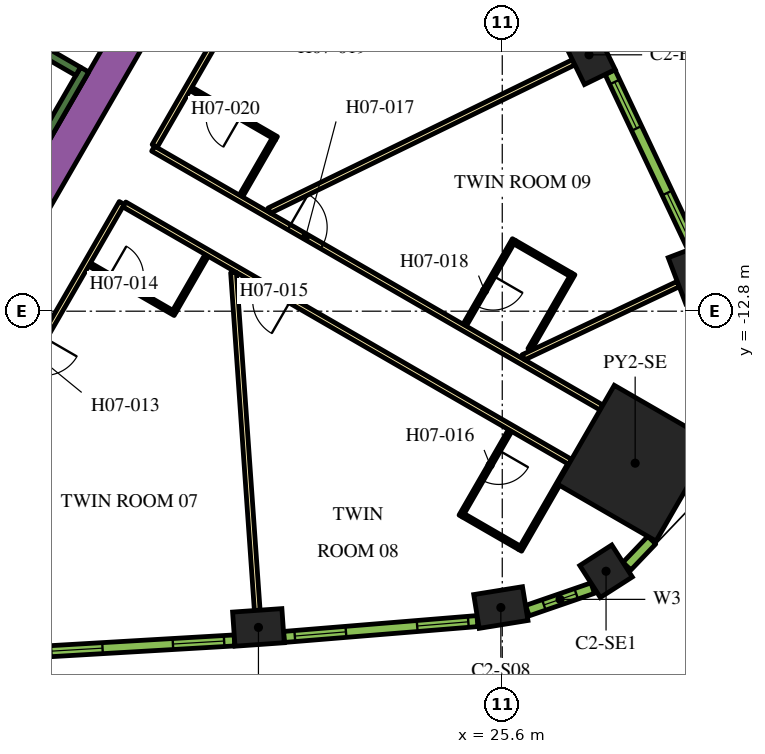
"""IFC4 building model, lengths in metres.
Left out: names, types, materials, properties, quantities, classifications, styles, units other than length and angle.
Written with IfcOpenShell. Run it as: python <this file> out.ifc"""

import sys

from ifc_helpers import new_model, si_unit, direction, frame, frame_2d, origin, origin_2d, place, context, subcontext, project, spatial, rectangle, extrude, element, fill, save


model = new_model("IFC4")
c1 = context("Model", 3, precision=1e-05, world=origin(), true_north=direction((0.0, 1.0)))
c2 = subcontext(c1, "Body", "Model", "MODEL_VIEW")
j1 = project(units=[si_unit("LENGTHUNIT", "METRE"), si_unit("PLANEANGLEUNIT", "RADIAN")], contexts=[c1])
p1 = place(None, origin())
s1 = spatial("IfcSite", under=j1, at=p1, CompositionType="ELEMENT")
p2 = place(p1, origin())
s2 = spatial("IfcBuilding", under=s1, at=p2, CompositionType="ELEMENT")
p3 = place(p2, frame((0.0, 0.0, 99.3)))
s3 = spatial("IfcBuildingStorey", under=s2, at=p3, CompositionType="ELEMENT", Elevation=99.3)
p4 = place(p3, frame((29.097, -16.799, 0.0), z_axis=(0.0, 0.0, 1.0), x_axis=(0.866025403784, -0.5, 0.0)))
e1 = element("IfcColumn", 1, at=p4, inside=s3, PredefinedType="COLUMN", context=c2, shape_type="SweptSolid", body=[
    extrude(rectangle(XDim=3.0, YDim=3.0, at=origin_2d()), origin(), (0.0, 0.0, 1.0), 3.9),
])
for number, where, z_axis, x_axis in (
    (2, (19.184, -21.12, 0.0), (0.0, 0.0, 1.0), (0.998, 0.07, 0.0)),
    (3, (25.563, -20.597, 0.0), (0.0, 0.0, 1.0), (0.987, 0.159, 0.0)),
):
    element("IfcColumn", number, at=place(p3, frame(where, z_axis=z_axis, x_axis=x_axis)), inside=s3, PredefinedType="COLUMN", context=c2, shape_type="SweptSolid", body=[
        extrude(rectangle(XDim=1.3, YDim=0.9, at=origin_2d()), origin(), (0.0, 0.0, 1.0), 3.9),
    ])
p5 = place(p3, frame((28.331, -19.643, 0.0), z_axis=(0.0, 0.0, 1.0), x_axis=(0.841700252504, 0.53994507585, 0.0)))
e4 = element("IfcColumn", 4, at=p5, inside=s3, PredefinedType="COLUMN", context=c2, shape_type="SweptSolid", body=[
    extrude(rectangle(XDim=1.0, YDim=1.0, at=origin_2d()), origin(), (0.0, 0.0, 1.0), 3.9),
])
for number, where, z_axis, x_axis in (
    (5, (30.619, -11.839, 0.0), (0.0, 0.0, 1.0), (-0.355, 0.935, 0.0)),
    (6, (27.883, -6.054, 0.0), (0.0, 0.0, 1.0), (-0.438, 0.899, 0.0)),
):
    element("IfcColumn", number, at=place(p3, frame(where, z_axis=z_axis, x_axis=x_axis)), inside=s3, PredefinedType="COLUMN", context=c2, shape_type="SweptSolid", body=[
        extrude(rectangle(XDim=1.3, YDim=0.9, at=origin_2d()), origin(), (0.0, 0.0, 1.0), 3.9),
    ])
p6 = place(p3, frame((11.695, -12.644, 0.0), z_axis=(0.0, 0.0, 1.0), x_axis=(0.500010229568, 0.86601949766, 0.0)))
e7 = element("IfcWall", 7, at=p6, inside=s3, PredefinedType="SOLIDWALL", context=c2, shape_type="SweptSolid", body=[
    extrude(rectangle(XDim=9.326, YDim=0.9, at=frame_2d((4.663, 0.0))), origin(), (0.0, 0.0, 1.0), 3.9),
])
p7 = place(p3, frame((12.885, -9.431, 0.0), z_axis=(0.0, 0.0, 1.0), x_axis=(0.500020560727, 0.866013532718, 0.0)))
e8 = element("IfcWall", 8, at=p7, inside=s3, PredefinedType="SOLIDWALL", context=c2, shape_type="SweptSolid", body=[
    extrude(rectangle(XDim=3.45, YDim=0.25, at=frame_2d((1.725, 0.0))), origin(), (0.0, 0.0, 1.0), 3.9),
])
p8 = place(p3, frame((8.334, -2.964, 0.0), z_axis=(0.0, 0.0, 1.0), x_axis=(0.866016039709, -0.500016218704, 0.0)))
e9 = element("IfcWall", 9, at=p8, inside=s3, PredefinedType="SOLIDWALL", context=c2, shape_type="SweptSolid", body=[
    extrude(rectangle(XDim=7.05, YDim=0.25, at=frame_2d((3.525, 0.0))), origin(), (0.0, 0.0, 1.0), 3.9),
])
p9 = place(p3, frame((16.412, -8.523, 0.0), z_axis=(0.0, 0.0, 1.0), x_axis=(0.866025629663, -0.499999608766, 0.0)))
e10 = element("IfcWall", 10, at=p9, inside=s3, PredefinedType="PARTITIONING", context=c2, shape_type="SweptSolid", body=[
    extrude(rectangle(XDim=13.624, YDim=0.15, at=frame_2d((6.812, 0.0))), origin(), (0.0, 0.0, 1.0), 2.75),
])
p10 = place(p9, frame((4.134, 0.0, 0.0)))
e11 = element("IfcOpeningElement", 11, at=p10, cuts=e10, PredefinedType="OPENING", context=c2, shape_type="SweptSolid", body=[
    extrude(rectangle(XDim=1.0, YDim=2.1, at=frame_2d((0.5, 1.05))), frame((0.0, 0.085, 0.0), z_axis=(0.0, -1.0, 0.0), x_axis=(1.0, 0.0, 0.0)), (0.0, 0.0, 1.0), 0.17),
])
p11 = place(p3, frame((19.081, -3.9, 0.0), z_axis=(0.0, 0.0, 1.0), x_axis=(-0.499974327079, -0.866040225545, 0.0)))
e12 = element("IfcWall", 12, at=p11, inside=s3, PredefinedType="PARTITIONING", context=c2, shape_type="SweptSolid", body=[
    extrude(rectangle(XDim=5.258, YDim=0.15, at=frame_2d((2.629, 0.0))), origin(), (0.0, 0.0, 1.0), 2.75),
])
p12 = place(p11, frame((0.18, 0.0, 0.0)))
e13 = element("IfcOpeningElement", 13, at=p12, cuts=e12, PredefinedType="OPENING", context=c2, shape_type="SweptSolid", body=[
    extrude(rectangle(XDim=1.0, YDim=2.1, at=frame_2d((0.5, 1.05))), frame((0.0, 0.085, 0.0), z_axis=(0.0, -1.0, 0.0), x_axis=(1.0, 0.0, 0.0)), (0.0, 0.0, 1.0), 0.17),
])
p13 = place(p3, frame((15.587, -9.952, 0.0), z_axis=(0.0, 0.0, 1.0), x_axis=(-0.500016618951, -0.866015808616, 0.0)))
e14 = element("IfcWall", 14, at=p13, inside=s3, PredefinedType="PARTITIONING", context=c2, shape_type="SweptSolid", body=[
    extrude(rectangle(XDim=5.268, YDim=0.15, at=frame_2d((2.634, 0.0))), origin(), (0.0, 0.0, 1.0), 2.75),
])
p14 = place(p13, frame((4.088, 0.0, 0.0)))
e15 = element("IfcOpeningElement", 15, at=p14, cuts=e14, PredefinedType="OPENING", context=c2, shape_type="SweptSolid", body=[
    extrude(rectangle(XDim=1.0, YDim=2.1, at=frame_2d((0.5, 1.05))), frame((0.0, 0.085, 0.0), z_axis=(0.0, -1.0, 0.0), x_axis=(1.0, 0.0, 0.0)), (0.0, 0.0, 1.0), 0.17),
])
p15 = place(p3, frame((27.386, -16.764, 0.0), z_axis=(0.0, 0.0, 1.0), x_axis=(-0.866022585856, 0.500004880763, 0.0)))
e16 = element("IfcWall", 16, at=p15, inside=s3, PredefinedType="PARTITIONING", context=c2, shape_type="SweptSolid", body=[
    extrude(rectangle(XDim=13.544, YDim=0.15, at=frame_2d((6.772, 0.0))), origin(), (0.0, 0.0, 1.0), 2.75),
])
p16 = place(p15, frame((8.491, 0.0, 0.0)))
e17 = element("IfcOpeningElement", 17, at=p16, cuts=e16, PredefinedType="OPENING", context=c2, shape_type="SweptSolid", body=[
    extrude(rectangle(XDim=1.0, YDim=2.1, at=frame_2d((0.5, 1.05))), frame((0.0, 0.085, 0.0), z_axis=(0.0, -1.0, 0.0), x_axis=(1.0, 0.0, 0.0)), (0.0, 0.0, 1.0), 0.17),
])
p17 = place(p3, frame((19.153, -20.671, 0.0), z_axis=(0.0, 0.0, 1.0), x_axis=(-0.070070736723, 0.997542025107, 0.0)))
e18 = element("IfcWall", 18, at=p17, inside=s3, PredefinedType="PARTITIONING", context=c2, shape_type="SweptSolid", body=[
    extrude(rectangle(XDim=8.909, YDim=0.15, at=frame_2d((4.455, 0.0))), origin(), (0.0, 0.0, 1.0), 2.75),
])
p18 = place(p3, frame((27.479, -6.251, 0.0), z_axis=(0.0, 0.0, 1.0), x_axis=(-0.898945877276, -0.438059710231, 0.0)))
e19 = element("IfcWall", 19, at=p18, inside=s3, PredefinedType="PARTITIONING", context=c2, shape_type="SweptSolid", body=[
    extrude(rectangle(XDim=8.909, YDim=0.15, at=frame_2d((4.455, 0.0))), origin(), (0.0, 0.0, 1.0), 2.75),
])
p19 = place(p3, frame((30.231, -12.085, 0.0), z_axis=(0.0, 0.0, 1.0), x_axis=(-0.904001132572, -0.427530060122, 0.0)))
e20 = element("IfcWall", 20, at=p19, inside=s3, PredefinedType="PARTITIONING", context=c2, shape_type="SweptSolid", body=[
    extrude(rectangle(XDim=4.51, YDim=0.15, at=frame_2d((2.255, 0.0))), origin(), (0.0, 0.0, 1.0), 2.75),
])
p20 = place(p3, frame((14.74, -11.57, 0.0), z_axis=(0.0, 0.0, 1.0), x_axis=(0.866021400173, -0.500006934395, 0.0)))
e21 = element("IfcWall", 21, at=p20, inside=s3, PredefinedType="PARTITIONING", context=c2, shape_type="SweptSolid", body=[
    extrude(rectangle(XDim=2.6, YDim=0.1, at=frame_2d((1.3, 0.0))), origin(), (0.0, 0.0, 1.0), 2.75),
])
p21 = place(p20, frame((0.6, 0.0, 0.0)))
e22 = element("IfcOpeningElement", 22, at=p21, cuts=e21, PredefinedType="OPENING", context=c2, shape_type="SweptSolid", body=[
    extrude(rectangle(XDim=0.9, YDim=2.1, at=frame_2d((0.45, 1.05))), frame((0.0, 0.06, 0.0), z_axis=(0.0, -1.0, 0.0), x_axis=(1.0, 0.0, 0.0)), (0.0, 0.0, 1.0), 0.12),
])
p22 = place(p3, frame((16.978, -12.793, 0.0), z_axis=(0.0, 0.0, 1.0), x_axis=(0.500147619332, 0.865940158947, 0.0)))
e23 = element("IfcWall", 23, at=p22, inside=s3, PredefinedType="PARTITIONING", context=c2, shape_type="SweptSolid", body=[
    extrude(rectangle(XDim=1.69, YDim=0.1, at=frame_2d((0.845, 0.0))), origin(), (0.0, 0.0, 1.0), 2.75),
])
p23 = place(p3, frame((25.807, -15.939, 0.0), z_axis=(0.0, 0.0, 1.0), x_axis=(-0.500006934395, -0.866021400173, 0.0)))
e24 = element("IfcWall", 24, at=p23, inside=s3, PredefinedType="PARTITIONING", context=c2, shape_type="SweptSolid", body=[
    extrude(rectangle(XDim=2.6, YDim=0.1, at=frame_2d((1.3, 0.0))), origin(), (0.0, 0.0, 1.0), 2.75),
])
p24 = place(p23, frame((0.6, 0.0, 0.0)))
e25 = element("IfcOpeningElement", 25, at=p24, cuts=e24, PredefinedType="OPENING", context=c2, shape_type="SweptSolid", body=[
    extrude(rectangle(XDim=0.9, YDim=2.1, at=frame_2d((0.45, 1.05))), frame((0.0, 0.06, 0.0), z_axis=(0.0, -1.0, 0.0), x_axis=(1.0, 0.0, 0.0)), (0.0, 0.0, 1.0), 0.12),
])
p25 = place(p3, frame((24.575, -18.172, 0.0), z_axis=(0.0, 0.0, 1.0), x_axis=(0.865989465428, -0.500062241894, 0.0)))
e26 = element("IfcWall", 26, at=p25, inside=s3, PredefinedType="PARTITIONING", context=c2, shape_type="SweptSolid", body=[
    extrude(rectangle(XDim=1.7, YDim=0.1, at=frame_2d((0.85, 0.0))), origin(), (0.0, 0.0, 1.0), 2.75),
])
p26 = place(p3, frame((27.365, -16.839, 0.0), z_axis=(0.0, 0.0, 1.0), x_axis=(-0.500006934395, -0.866021400173, 0.0)))
e27 = element("IfcWall", 27, at=p26, inside=s3, PredefinedType="PARTITIONING", context=c2, shape_type="SweptSolid", body=[
    extrude(rectangle(XDim=2.6, YDim=0.1, at=frame_2d((1.3, 0.0))), origin(), (0.0, 0.0, 1.0), 2.75),
])
p27 = place(p3, frame((25.91, -10.918, 0.0), z_axis=(0.0, 0.0, 1.0), x_axis=(-0.500006934395, -0.866021400173, 0.0)))
e28 = element("IfcWall", 28, at=p27, inside=s3, PredefinedType="PARTITIONING", context=c2, shape_type="SweptSolid", body=[
    extrude(rectangle(XDim=2.6, YDim=0.1, at=frame_2d((1.3, 0.0))), origin(), (0.0, 0.0, 1.0), 2.75),
])
p28 = place(p27, frame((1.1, 0.0, 0.0)))
e29 = element("IfcOpeningElement", 29, at=p28, cuts=e28, PredefinedType="OPENING", context=c2, shape_type="SweptSolid", body=[
    extrude(rectangle(XDim=0.9, YDim=2.1, at=frame_2d((0.45, 1.05))), frame((0.0, 0.06, 0.0), z_axis=(0.0, -1.0, 0.0), x_axis=(1.0, 0.0, 0.0)), (0.0, 0.0, 1.0), 0.12),
])
p29 = place(p3, frame((25.928, -10.986, 0.0), z_axis=(0.0, 0.0, 1.0), x_axis=(0.866025371046, -0.500000056704, 0.0)))
e30 = element("IfcWall", 30, at=p29, inside=s3, PredefinedType="PARTITIONING", context=c2, shape_type="SweptSolid", body=[
    extrude(rectangle(XDim=1.7, YDim=0.1, at=frame_2d((0.85, 0.0))), origin(), (0.0, 0.0, 1.0), 2.75),
])
p30 = place(p3, frame((26.319, -13.81, 0.0), z_axis=(0.0, 0.0, 1.0), x_axis=(0.499952165731, 0.866053019151, 0.0)))
e31 = element("IfcWall", 31, at=p30, inside=s3, PredefinedType="PARTITIONING", context=c2, shape_type="SweptSolid", body=[
    extrude(rectangle(XDim=2.3, YDim=0.1, at=frame_2d((1.15, 0.0))), origin(), (0.0, 0.0, 1.0), 2.75),
])
p31 = place(p3, frame((19.659, -8.25, 0.0), z_axis=(0.0, 0.0, 1.0), x_axis=(-0.866021400173, 0.500006934395, 0.0)))
e32 = element("IfcWall", 32, at=p31, inside=s3, PredefinedType="PARTITIONING", context=c2, shape_type="SweptSolid", body=[
    extrude(rectangle(XDim=2.6, YDim=0.1, at=frame_2d((1.3, 0.0))), origin(), (0.0, 0.0, 1.0), 2.75),
])
p32 = place(p31, frame((1.1, 0.0, 0.0)))
e33 = element("IfcOpeningElement", 33, at=p32, cuts=e32, PredefinedType="OPENING", context=c2, shape_type="SweptSolid", body=[
    extrude(rectangle(XDim=0.9, YDim=2.1, at=frame_2d((0.45, 1.05))), frame((0.0, 0.06, 0.0), z_axis=(0.0, -1.0, 0.0), x_axis=(1.0, 0.0, 0.0)), (0.0, 0.0, 1.0), 0.12),
])
p33 = place(p3, frame((19.591, -8.268, 0.0), z_axis=(0.0, 0.0, 1.0), x_axis=(-0.500040090343, -0.866002256377, 0.0)))
e34 = element("IfcWall", 34, at=p33, inside=s3, PredefinedType="PARTITIONING", context=c2, shape_type="SweptSolid", body=[
    extrude(rectangle(XDim=1.73, YDim=0.1, at=frame_2d((0.865, 0.0))), origin(), (0.0, 0.0, 1.0), 2.75),
])
p34 = place(p3, frame((13.462, -21.761, 0.0), z_axis=(0.0, 0.0, 1.0), x_axis=(0.998290511436, 0.058447025388, 0.0)))
e35 = element("IfcWall", 35, at=p34, inside=s3, PredefinedType="SOLIDWALL", context=c2, shape_type="SweptSolid", body=[
    extrude(rectangle(XDim=5.1, YDim=0.29, at=frame_2d((2.55, 0.0))), origin(), (0.0, 0.0, 1.0), 3.65),
])
p35 = place(p34, frame((0.272, 0.0, 0.9)))
e36 = element("IfcOpeningElement", 36, at=p35, cuts=e35, PredefinedType="OPENING", context=c2, shape_type="SweptSolid", body=[
    extrude(rectangle(XDim=1.35, YDim=2.15, at=frame_2d((0.675, 1.075))), frame((0.0, 0.155, 0.0), z_axis=(0.0, -1.0, 0.0), x_axis=(1.0, 0.0, 0.0)), (0.0, 0.0, 1.0), 0.31),
])
p36 = place(p34, frame((3.478, 0.0, 0.9)))
e37 = element("IfcOpeningElement", 37, at=p36, cuts=e35, PredefinedType="OPENING", context=c2, shape_type="SweptSolid", body=[
    extrude(rectangle(XDim=1.35, YDim=2.15, at=frame_2d((0.675, 1.075))), frame((0.0, 0.155, 0.0), z_axis=(0.0, -1.0, 0.0), x_axis=(1.0, 0.0, 0.0)), (0.0, 0.0, 1.0), 0.31),
])
p37 = place(p3, frame((19.857, -21.371, 0.0), z_axis=(0.0, 0.0, 1.0), x_axis=(0.99665273362, 0.081751627308, 0.0)))
e38 = element("IfcWall", 38, at=p37, inside=s3, PredefinedType="SOLIDWALL", context=c2, shape_type="SweptSolid", body=[
    extrude(rectangle(XDim=5.107, YDim=0.29, at=frame_2d((2.553, 0.0))), origin(), (0.0, 0.0, 1.0), 3.65),
])
p38 = place(p37, frame((0.285, 0.0, 0.9)))
e39 = element("IfcOpeningElement", 39, at=p38, cuts=e38, PredefinedType="OPENING", context=c2, shape_type="SweptSolid", body=[
    extrude(rectangle(XDim=1.35, YDim=2.15, at=frame_2d((0.675, 1.075))), frame((0.0, 0.155, 0.0), z_axis=(0.0, -1.0, 0.0), x_axis=(1.0, 0.0, 0.0)), (0.0, 0.0, 1.0), 0.31),
])
p39 = place(p37, frame((3.516, 0.0, 0.9)))
e40 = element("IfcOpeningElement", 40, at=p39, cuts=e38, PredefinedType="OPENING", context=c2, shape_type="SweptSolid", body=[
    extrude(rectangle(XDim=1.35, YDim=2.15, at=frame_2d((0.675, 1.075))), frame((0.0, 0.155, 0.0), z_axis=(0.0, -1.0, 0.0), x_axis=(1.0, 0.0, 0.0)), (0.0, 0.0, 1.0), 0.31),
])
p40 = place(p3, frame((26.261, -20.679, 0.0), z_axis=(0.0, 0.0, 1.0), x_axis=(0.945385815453, 0.325953462844, 0.0)))
e41 = element("IfcWall", 41, at=p40, inside=s3, PredefinedType="SOLIDWALL", context=c2, shape_type="SweptSolid", body=[
    extrude(rectangle(XDim=1.819, YDim=0.29, at=frame_2d((0.91, 0.0))), origin(), (0.0, 0.0, 1.0), 3.65),
])
p41 = place(p40, frame((0.46, 0.0, 0.9)))
e42 = element("IfcOpeningElement", 42, at=p41, cuts=e41, PredefinedType="OPENING", context=c2, shape_type="SweptSolid", body=[
    extrude(rectangle(XDim=0.9, YDim=2.15, at=frame_2d((0.45, 1.075))), frame((0.0, 0.155, 0.0), z_axis=(0.0, -1.0, 0.0), x_axis=(1.0, 0.0, 0.0)), (0.0, 0.0, 1.0), 0.31),
])
p42 = place(p3, frame((28.88, -19.509, 0.0), z_axis=(0.0, 0.0, 1.0), x_axis=(0.690414427296, 0.723414071319, 0.0)))
e43 = element("IfcWall", 43, at=p42, inside=s3, PredefinedType="SOLIDWALL", context=c2, shape_type="SweptSolid", body=[
    extrude(rectangle(XDim=0.947, YDim=0.29, at=frame_2d((0.474, 0.0))), origin(), (0.0, 0.0, 1.0), 3.65),
])
p43 = place(p3, frame((30.62, -11.127, 0.0), z_axis=(0.0, 0.0, 1.0), x_axis=(-0.427543726596, 0.903994669148, 0.0)))
e44 = element("IfcWall", 44, at=p43, inside=s3, PredefinedType="SOLIDWALL", context=c2, shape_type="SweptSolid", body=[
    extrude(rectangle(XDim=5.107, YDim=0.29, at=frame_2d((2.553, 0.0))), origin(), (0.0, 0.0, 1.0), 3.65),
])
p44 = place(p43, frame((0.24, 0.0, 0.9)))
e45 = element("IfcOpeningElement", 45, at=p44, cuts=e44, PredefinedType="OPENING", context=c2, shape_type="SweptSolid", body=[
    extrude(rectangle(XDim=1.35, YDim=2.15, at=frame_2d((0.675, 1.075))), frame((0.0, 0.155, 0.0), z_axis=(0.0, -1.0, 0.0), x_axis=(1.0, 0.0, 0.0)), (0.0, 0.0, 1.0), 0.31),
])
p45 = place(p43, frame((3.471, 0.0, 0.9)))
e46 = element("IfcOpeningElement", 46, at=p45, cuts=e44, PredefinedType="OPENING", context=c2, shape_type="SweptSolid", body=[
    extrude(rectangle(XDim=1.35, YDim=2.15, at=frame_2d((0.675, 1.075))), frame((0.0, 0.155, 0.0), z_axis=(0.0, -1.0, 0.0), x_axis=(1.0, 0.0, 0.0)), (0.0, 0.0, 1.0), 0.31),
])
p46 = place(p21, origin())
e47 = element("IfcDoor", 47, at=p46, inside=s3, OperationType="SINGLE_SWING_LEFT", PredefinedType="DOOR", context=c2, shape_type="SweptSolid", body=[
    extrude(rectangle(XDim=0.9, YDim=2.1, at=frame_2d((0.45, 1.05))), frame((0.0, 0.025, 0.0), z_axis=(0.0, -1.0, 0.0), x_axis=(1.0, 0.0, 0.0)), (0.0, 0.0, 1.0), 0.05),
])
fill(e22, e47)
p47 = place(p16, origin())
e48 = element("IfcDoor", 48, at=p47, inside=s3, OperationType="SINGLE_SWING_RIGHT", PredefinedType="DOOR", context=c2, shape_type="SweptSolid", body=[
    extrude(rectangle(XDim=1.0, YDim=2.1, at=frame_2d((0.5, 1.05))), frame((0.0, 0.025, 0.0), z_axis=(0.0, -1.0, 0.0), x_axis=(1.0, 0.0, 0.0)), (0.0, 0.0, 1.0), 0.05),
])
fill(e17, e48)
p48 = place(p24, origin())
e49 = element("IfcDoor", 49, at=p48, inside=s3, OperationType="SINGLE_SWING_LEFT", PredefinedType="DOOR", context=c2, shape_type="SweptSolid", body=[
    extrude(rectangle(XDim=0.9, YDim=2.1, at=frame_2d((0.45, 1.05))), frame((0.0, 0.025, 0.0), z_axis=(0.0, -1.0, 0.0), x_axis=(1.0, 0.0, 0.0)), (0.0, 0.0, 1.0), 0.05),
])
fill(e25, e49)
p49 = place(p10, origin())
e50 = element("IfcDoor", 50, at=p49, inside=s3, OperationType="SINGLE_SWING_LEFT", PredefinedType="DOOR", context=c2, shape_type="SweptSolid", body=[
    extrude(rectangle(XDim=1.0, YDim=2.1, at=frame_2d((0.5, 1.05))), frame((0.0, 0.025, 0.0), z_axis=(0.0, -1.0, 0.0), x_axis=(1.0, 0.0, 0.0)), (0.0, 0.0, 1.0), 0.05),
])
fill(e11, e50)
p50 = place(p28, origin())
e51 = element("IfcDoor", 51, at=p50, inside=s3, OperationType="SINGLE_SWING_RIGHT", PredefinedType="DOOR", context=c2, shape_type="SweptSolid", body=[
    extrude(rectangle(XDim=0.9, YDim=2.1, at=frame_2d((0.45, 1.05))), frame((0.0, 0.025, 0.0), z_axis=(0.0, -1.0, 0.0), x_axis=(1.0, 0.0, 0.0)), (0.0, 0.0, 1.0), 0.05),
])
fill(e29, e51)
p51 = place(p32, origin())
e52 = element("IfcDoor", 52, at=p51, inside=s3, OperationType="SINGLE_SWING_LEFT", PredefinedType="DOOR", context=c2, shape_type="SweptSolid", body=[
    extrude(rectangle(XDim=0.9, YDim=2.1, at=frame_2d((0.45, 1.05))), frame((0.0, 0.025, 0.0), z_axis=(0.0, -1.0, 0.0), x_axis=(1.0, 0.0, 0.0)), (0.0, 0.0, 1.0), 0.05),
])
fill(e33, e52)
p52 = place(p35, origin())
e53 = element("IfcWindow", 53, at=p52, inside=s3, PartitioningType="DOUBLE_PANEL_VERTICAL", PredefinedType="WINDOW", context=c2, shape_type="SweptSolid", body=[
    extrude(rectangle(XDim=1.35, YDim=2.15, at=frame_2d((0.675, 1.075))), frame((0.0, 0.015, 0.0), z_axis=(0.0, -1.0, 0.0), x_axis=(1.0, 0.0, 0.0)), (0.0, 0.0, 1.0), 0.06),
])
fill(e36, e53)
p53 = place(p36, origin())
e54 = element("IfcWindow", 54, at=p53, inside=s3, PartitioningType="DOUBLE_PANEL_VERTICAL", PredefinedType="WINDOW", context=c2, shape_type="SweptSolid", body=[
    extrude(rectangle(XDim=1.35, YDim=2.15, at=frame_2d((0.675, 1.075))), frame((0.0, 0.015, 0.0), z_axis=(0.0, -1.0, 0.0), x_axis=(1.0, 0.0, 0.0)), (0.0, 0.0, 1.0), 0.06),
])
fill(e37, e54)
p54 = place(p38, origin())
e55 = element("IfcWindow", 55, at=p54, inside=s3, PartitioningType="DOUBLE_PANEL_VERTICAL", PredefinedType="WINDOW", context=c2, shape_type="SweptSolid", body=[
    extrude(rectangle(XDim=1.35, YDim=2.15, at=frame_2d((0.675, 1.075))), frame((0.0, 0.015, 0.0), z_axis=(0.0, -1.0, 0.0), x_axis=(1.0, 0.0, 0.0)), (0.0, 0.0, 1.0), 0.06),
])
fill(e39, e55)
p55 = place(p39, origin())
e56 = element("IfcWindow", 56, at=p55, inside=s3, PartitioningType="DOUBLE_PANEL_VERTICAL", PredefinedType="WINDOW", context=c2, shape_type="SweptSolid", body=[
    extrude(rectangle(XDim=1.35, YDim=2.15, at=frame_2d((0.675, 1.075))), frame((0.0, 0.015, 0.0), z_axis=(0.0, -1.0, 0.0), x_axis=(1.0, 0.0, 0.0)), (0.0, 0.0, 1.0), 0.06),
])
fill(e40, e56)
p56 = place(p41, origin())
e57 = element("IfcWindow", 57, at=p56, inside=s3, PartitioningType="SINGLE_PANEL", PredefinedType="WINDOW", context=c2, shape_type="SweptSolid", body=[
    extrude(rectangle(XDim=0.9, YDim=2.15, at=frame_2d((0.45, 1.075))), frame((0.0, 0.015, 0.0), z_axis=(0.0, -1.0, 0.0), x_axis=(1.0, 0.0, 0.0)), (0.0, 0.0, 1.0), 0.06),
])
fill(e42, e57)
p57 = place(p44, origin())
e58 = element("IfcWindow", 58, at=p57, inside=s3, PartitioningType="DOUBLE_PANEL_VERTICAL", PredefinedType="WINDOW", context=c2, shape_type="SweptSolid", body=[
    extrude(rectangle(XDim=1.35, YDim=2.15, at=frame_2d((0.675, 1.075))), frame((0.0, 0.015, 0.0), z_axis=(0.0, -1.0, 0.0), x_axis=(1.0, 0.0, 0.0)), (0.0, 0.0, 1.0), 0.06),
])
fill(e45, e58)
p58 = place(p45, origin())
e59 = element("IfcWindow", 59, at=p58, inside=s3, PartitioningType="DOUBLE_PANEL_VERTICAL", PredefinedType="WINDOW", context=c2, shape_type="SweptSolid", body=[
    extrude(rectangle(XDim=1.35, YDim=2.15, at=frame_2d((0.675, 1.075))), frame((0.0, 0.015, 0.0), z_axis=(0.0, -1.0, 0.0), x_axis=(1.0, 0.0, 0.0)), (0.0, 0.0, 1.0), 0.06),
])
fill(e46, e59)
save(model, sys.argv[1])
